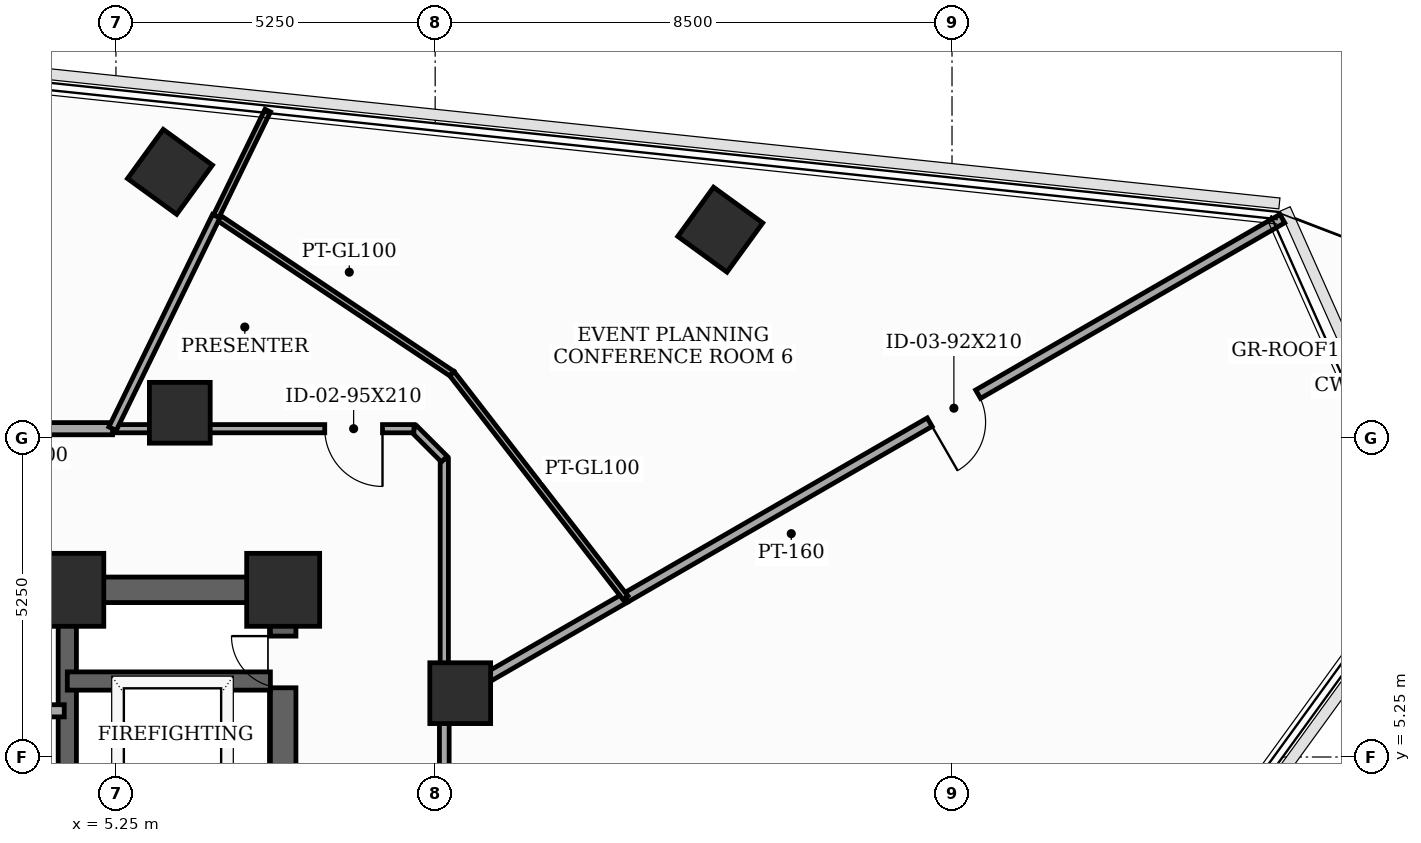
"""IFC4 building model, lengths in metres.
Left out: names, types, materials, properties, quantities, classifications, styles, units other than length and angle.
Written with IfcOpenShell. Run it as: python <this file> out.ifc"""

import sys

from ifc_helpers import new_model, si_unit, direction, frame, frame_2d, origin, origin_2d, place, context, subcontext, project, spatial, rectangle, extrude, element, fill, save


model = new_model("IFC4")
c1 = context("Model", 3, precision=1e-05, world=origin(), true_north=direction((0.0, 1.0)))
c2 = subcontext(c1, "Body", "Model", "MODEL_VIEW")
j1 = project(units=[si_unit("LENGTHUNIT", "METRE"), si_unit("PLANEANGLEUNIT", "RADIAN")], contexts=[c1])
p1 = place(None, origin())
s1 = spatial("IfcSite", under=j1, at=p1, CompositionType="ELEMENT")
p2 = place(p1, origin())
s2 = spatial("IfcBuilding", under=s1, at=p2, CompositionType="ELEMENT")
p3 = place(p2, frame((0.0, 0.0, 241.1)))
s3 = spatial("IfcBuildingStorey", under=s2, at=p3, CompositionType="ELEMENT", Elevation=241.1)
for number, where, z_axis, x_axis in (
    (1, (8.0, 8.0, 0.0), (0.0, 0.0, 1.0), (1.0, 0.0, 0.0)),
    (2, (4.45, 8.0, 0.0), (0.0, 0.0, 1.0), (1.0, 0.0, 0.0)),
):
    element("IfcColumn", number, at=place(p3, frame(where, z_axis=z_axis, x_axis=x_axis)), inside=s3, PredefinedType="COLUMN", context=c2, shape_type="SweptSolid", body=[
        extrude(rectangle(XDim=1.2, YDim=1.2, at=origin_2d()), origin(), (0.0, 0.0, 1.0), 3.7),
    ])
for number, where, z_axis, x_axis in (
    (3, (10.912, 6.3, 0.0), (0.0, 0.0, 1.0), (1.0, 0.0, 0.0)),
    (4, (6.3, 10.912, 0.0), (0.0, 0.0, 1.0), (1.0, 0.0, 0.0)),
    (5, (15.188, 13.923, 0.0), (0.0, 0.0, 1.0), (0.588, 0.809, 0.0)),
    (6, (6.138, 14.875, 0.0), (0.0, 0.0, 1.0), (0.588, 0.809, 0.0)),
):
    element("IfcColumn", number, at=place(p3, frame(where, z_axis=z_axis, x_axis=x_axis)), inside=s3, PredefinedType="COLUMN", context=c2, shape_type="SweptSolid", body=[
        extrude(rectangle(XDim=1.0, YDim=1.0, at=origin_2d()), origin(), (0.0, 0.0, 1.0), 3.7),
    ])
p4 = place(p3, frame((8.0, -8.0, 0.0), z_axis=(0.0, 0.0, 1.0), x_axis=(0.0, 1.0, 0.0)))
e7 = element("IfcWall", 7, at=p4, inside=s3, PredefinedType="SHEAR", context=c2, shape_type="SweptSolid", body=[
    extrude(rectangle(XDim=16.0, YDim=0.42, at=frame_2d((8.0, 0.0))), origin(), (0.0, 0.0, 1.0), 3.5),
])
p5 = place(p4, frame((9.6, 0.0, 0.0)))
e8 = element("IfcOpeningElement", 8, at=p5, cuts=e7, PredefinedType="OPENING", context=c2, shape_type="SweptSolid", body=[
    extrude(rectangle(XDim=1.05, YDim=2.15, at=frame_2d((0.525, 1.075))), frame((0.0, 0.22, 0.0), z_axis=(0.0, -1.0, 0.0), x_axis=(1.0, 0.0, 0.0)), (0.0, 0.0, 1.0), 0.44),
])
p6 = place(p4, frame((14.389, 0.0, 0.0)))
e9 = element("IfcOpeningElement", 9, at=p6, cuts=e7, PredefinedType="OPENING", context=c2, shape_type="SweptSolid", body=[
    extrude(rectangle(XDim=0.85, YDim=2.02, at=frame_2d((0.425, 1.01))), frame((0.0, 0.22, 0.0), z_axis=(0.0, -1.0, 0.0), x_axis=(1.0, 0.0, 0.0)), (0.0, 0.0, 1.0), 0.44),
])
p7 = place(p3, frame((-8.0, 8.0, 0.0), z_axis=(0.0, 0.0, 1.0), x_axis=(1.0, 0.0, 0.0)))
e10 = element("IfcWall", 10, at=p7, inside=s3, PredefinedType="SHEAR", context=c2, shape_type="SweptSolid", body=[
    extrude(rectangle(XDim=16.0, YDim=0.42, at=frame_2d((8.0, 0.0))), origin(), (0.0, 0.0, 1.0), 3.5),
])
p8 = place(p7, frame((7.1, 0.0, 0.0)))
e11 = element("IfcOpeningElement", 11, at=p8, cuts=e10, PredefinedType="OPENING", context=c2, shape_type="SweptSolid", body=[
    extrude(rectangle(XDim=1.8, YDim=2.15, at=frame_2d((0.9, 1.075))), frame((0.0, 0.22, 0.0), z_axis=(0.0, -1.0, 0.0), x_axis=(1.0, 0.0, 0.0)), (0.0, 0.0, 1.0), 0.44),
])
p9 = place(p3, frame((4.45, -7.79, 0.0), z_axis=(0.0, 0.0, 1.0), x_axis=(0.0, 1.0, 0.0)))
e12 = element("IfcWall", 12, at=p9, inside=s3, PredefinedType="SHEAR", context=c2, shape_type="SweptSolid", body=[
    extrude(rectangle(XDim=15.58, YDim=0.3, at=frame_2d((7.79, 0.0))), origin(), (0.0, 0.0, 1.0), 3.5),
])
p10 = place(p3, frame((4.45, 6.5, 0.0), z_axis=(0.0, 0.0, 1.0), x_axis=(1.0, 0.0, 0.0)))
e13 = element("IfcWall", 13, at=p10, inside=s3, PredefinedType="SHEAR", context=c2, shape_type="SweptSolid", body=[
    extrude(rectangle(XDim=3.34, YDim=0.3, at=frame_2d((1.67, 0.0))), origin(), (0.0, 0.0, 1.0), 3.5),
])
p11 = place(p3, frame((1.72, 6.01, 0.0), z_axis=(0.0, 0.0, 1.0), x_axis=(1.0, 0.0, 0.0)))
e14 = element("IfcWall", 14, at=p11, inside=s3, PredefinedType="SOLIDWALL", context=c2, shape_type="SweptSolid", body=[
    extrude(rectangle(XDim=2.68, YDim=0.2, at=frame_2d((1.34, 0.0))), origin(), (0.0, 0.0, 1.0), 3.5),
])
p12 = place(p3, frame((10.65, 2.45, 0.0), z_axis=(0.0, 0.0, 1.0), x_axis=(0.0, 1.0, 0.0)))
e15 = element("IfcWall", 15, at=p12, inside=s3, PredefinedType="PARTITIONING", context=c2, shape_type="SweptSolid", body=[
    extrude(rectangle(XDim=3.699, YDim=0.16, at=frame_2d((1.85, 0.0))), origin(), (0.0, 0.0, 1.0), 3.5),
])
p13 = place(p3, frame((10.65, 6.149, 0.0), z_axis=(0.0, 0.0, 1.0), x_axis=(0.0, 1.0, 0.0)))
e16 = element("IfcWall", 16, at=p13, inside=s3, PredefinedType="PARTITIONING", context=c2, shape_type="SweptSolid", body=[
    extrude(rectangle(XDim=4.001, YDim=0.135, at=frame_2d((2.0, 0.0))), origin(), (0.0, 0.0, 1.0), 2.885),
])
p14 = place(p3, frame((10.65, 10.15, 0.0), z_axis=(0.0, 0.0, 1.0), x_axis=(-0.707106781187, 0.707106781187, 0.0)))
e17 = element("IfcWall", 17, at=p14, inside=s3, PredefinedType="PARTITIONING", context=c2, shape_type="SweptSolid", body=[
    extrude(rectangle(XDim=0.707, YDim=0.135, at=frame_2d((0.354, 0.0))), origin(), (0.0, 0.0, 1.0), 3.5),
])
p15 = place(p3, frame((10.15, 10.65, 0.0), z_axis=(0.0, 0.0, 1.0), x_axis=(-1.0, 0.0, 0.0)))
e18 = element("IfcWall", 18, at=p15, inside=s3, PredefinedType="PARTITIONING", context=c2, shape_type="SweptSolid", body=[
    extrude(rectangle(XDim=4.956, YDim=0.135, at=frame_2d((2.478, 0.0))), origin(), (0.0, 0.0, 1.0), 2.885),
])
p16 = place(p15, frame((0.516, 0.0, 0.0)))
e19 = element("IfcOpeningElement", 19, at=p16, cuts=e18, PredefinedType="OPENING", context=c2, shape_type="SweptSolid", body=[
    extrude(rectangle(XDim=0.95, YDim=2.1, at=frame_2d((0.475, 1.05))), frame((0.0, 0.077, 0.0), z_axis=(0.0, -1.0, 0.0), x_axis=(1.0, 0.0, 0.0)), (0.0, 0.0, 1.0), 0.155),
])
p17 = place(p3, frame((5.194, 10.65, 0.0), z_axis=(0.0, 0.0, 1.0), x_axis=(-1.0, 0.0, 0.0)))
e20 = element("IfcWall", 20, at=p17, inside=s3, PredefinedType="SOLIDWALL", context=c2, shape_type="SweptSolid", body=[
    extrude(rectangle(XDim=6.344, YDim=0.2, at=frame_2d((3.172, 0.0))), origin(), (0.0, 0.0, 1.0), 2.885),
])
p18 = place(p17, frame((2.697, 0.0, 0.0)))
e21 = element("IfcOpeningElement", 21, at=p18, cuts=e20, PredefinedType="OPENING", context=c2, shape_type="SweptSolid", body=[
    extrude(rectangle(XDim=0.95, YDim=2.1, at=frame_2d((0.475, 1.05))), frame((0.0, 0.11, 0.0), z_axis=(0.0, -1.0, 0.0), x_axis=(1.0, 0.0, 0.0)), (0.0, 0.0, 1.0), 0.22),
])
p19 = place(p3, frame((24.432, 14.106, 0.0), z_axis=(0.0, 0.0, 1.0), x_axis=(-0.866010870421, -0.500025171679, 0.0)))
e22 = element("IfcWall", 22, at=p19, inside=s3, PredefinedType="PARTITIONING", context=c2, shape_type="SweptSolid", body=[
    extrude(rectangle(XDim=12.473, YDim=0.16, at=frame_2d((6.236, 0.0))), origin(), (0.0, 0.0, 1.0), 3.035),
])
p20 = place(p19, frame((5.776, 0.0, 0.0)))
e23 = element("IfcOpeningElement", 23, at=p20, cuts=e22, PredefinedType="OPENING", context=c2, shape_type="SweptSolid", body=[
    extrude(rectangle(XDim=0.92, YDim=2.1, at=frame_2d((0.46, 1.05))), frame((0.0, 0.09, 0.0), z_axis=(0.0, -1.0, 0.0), x_axis=(1.0, 0.0, 0.0)), (0.0, 0.0, 1.0), 0.18),
])
p21 = place(p3, frame((13.63, 7.869, 0.0), z_axis=(0.0, 0.0, 1.0), x_axis=(-0.866091067331, -0.499886250151, 0.0)))
e24 = element("IfcWall", 24, at=p21, inside=s3, PredefinedType="PARTITIONING", context=c2, shape_type="SweptSolid", body=[
    extrude(rectangle(XDim=3.441, YDim=0.16, at=frame_2d((1.72, 0.0))), origin(), (0.0, 0.0, 1.0), 2.885),
])
p22 = place(p3, frame((6.899, 14.145, 0.0), z_axis=(0.0, 0.0, 1.0), x_axis=(0.831510168033, -0.555509532283, 0.0)))
e25 = element("IfcWall", 25, at=p22, inside=s3, PredefinedType="MOVABLE", context=c2, shape_type="SweptSolid", body=[
    extrude(rectangle(XDim=4.663, YDim=0.1, at=frame_2d((2.331, 0.0))), origin(), (0.0, 0.0, 1.0), 3.5),
])
p23 = place(p3, frame((10.776, 11.555, 0.0), z_axis=(0.0, 0.0, 1.0), x_axis=(0.612213330569, -0.790692631731, 0.0)))
e26 = element("IfcWall", 26, at=p23, inside=s3, PredefinedType="MOVABLE", context=c2, shape_type="SweptSolid", body=[
    extrude(rectangle(XDim=4.662, YDim=0.1, at=frame_2d((2.331, 0.0))), origin(), (0.0, 0.0, 1.0), 2.985),
])
p24 = place(p3, frame((7.747, 15.882, 0.0), z_axis=(0.0, 0.0, 1.0), x_axis=(-0.438553034404, -0.898705310998, 0.0)))
e27 = element("IfcWall", 27, at=p24, inside=s3, PredefinedType="MOVABLE", context=c2, shape_type="SweptSolid", body=[
    extrude(rectangle(XDim=1.933, YDim=0.1, at=frame_2d((0.966, 0.0))), origin(), (0.0, 0.0, 1.0), 3.035),
])
p25 = place(p3, frame((6.899, 14.145, 0.0), z_axis=(0.0, 0.0, 1.0), x_axis=(-0.438402604201, -0.898778702813, 0.0)))
e28 = element("IfcWall", 28, at=p25, inside=s3, PredefinedType="PARTITIONING", context=c2, shape_type="SweptSolid", body=[
    extrude(rectangle(XDim=3.889, YDim=0.135, at=frame_2d((1.944, 0.0))), origin(), (0.0, 0.0, 1.0), 2.885),
])
p26 = place(p6, origin())
e29 = element("IfcDoor", 29, at=p26, inside=s3, OperationType="SINGLE_SWING_RIGHT", PredefinedType="TRAPDOOR", context=c2, shape_type="SweptSolid", body=[
    extrude(rectangle(XDim=0.85, YDim=2.02, at=frame_2d((0.425, 1.01))), frame((0.0, 0.025, 0.0), z_axis=(0.0, -1.0, 0.0), x_axis=(1.0, 0.0, 0.0)), (0.0, 0.0, 1.0), 0.05),
])
fill(e9, e29)
p27 = place(p16, origin())
e30 = element("IfcDoor", 30, at=p27, inside=s3, OperationType="SINGLE_SWING_LEFT", PredefinedType="DOOR", context=c2, shape_type="SweptSolid", body=[
    extrude(rectangle(XDim=0.95, YDim=2.1, at=frame_2d((0.475, 1.05))), frame((0.0, 0.025, 0.0), z_axis=(0.0, -1.0, 0.0), x_axis=(1.0, 0.0, 0.0)), (0.0, 0.0, 1.0), 0.05),
])
fill(e19, e30)
p28 = place(p20, origin())
e31 = element("IfcDoor", 31, at=p28, inside=s3, OperationType="SINGLE_SWING_RIGHT", PredefinedType="DOOR", context=c2, shape_type="SweptSolid", body=[
    extrude(rectangle(XDim=0.92, YDim=2.1, at=frame_2d((0.46, 1.05))), frame((0.0, 0.025, 0.0), z_axis=(0.0, -1.0, 0.0), x_axis=(1.0, 0.0, 0.0)), (0.0, 0.0, 1.0), 0.05),
])
fill(e23, e31)
save(model, sys.argv[1])
